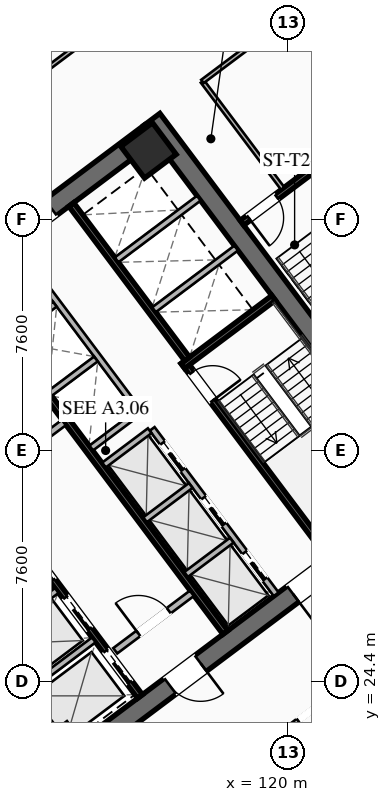
"""IFC4 building model, lengths in metres.
Left out: names, types, materials, properties, quantities, classifications, styles, units other than length and angle.
Written with IfcOpenShell. Run it as: python <this file> out.ifc"""

import sys

from ifc_helpers import new_model, si_unit, direction, frame, frame_2d, origin, origin_2d, place, context, subcontext, project, spatial, rectangle, hollow_rectangle, extrude, element, fill, save


model = new_model("IFC4")
c1 = context("Model", 3, precision=1e-05, world=origin(), true_north=direction((0.0, 1.0)))
c2 = subcontext(c1, "Body", "Model", "MODEL_VIEW")
j1 = project(units=[si_unit("LENGTHUNIT", "METRE"), si_unit("PLANEANGLEUNIT", "RADIAN")], contexts=[c1])
p1 = place(None, origin())
s1 = spatial("IfcSite", under=j1, at=p1, CompositionType="ELEMENT")
p2 = place(p1, origin())
s2 = spatial("IfcBuilding", under=s1, at=p2, CompositionType="ELEMENT")
p3 = place(p2, frame((0.0, 0.0, 84.95)))
s3 = spatial("IfcBuildingStorey", under=s2, at=p3, CompositionType="ELEMENT", Elevation=84.95)
for number, where, z_axis, x_axis in (
    (1, (112.476, 21.107, 0.0), (0.0, 0.0, 1.0), (-0.6, 0.8, 0.0)),
    (2, (115.524, 42.893, 0.0), (0.0, 0.0, 1.0), (0.6, -0.8, 0.0)),
):
    element("IfcWall", number, at=place(p3, frame(where, z_axis=z_axis, x_axis=x_axis)), inside=s3, PredefinedType="SHEAR", context=c2, shape_type="SweptSolid", body=[
        extrude(rectangle(XDim=15.6, YDim=0.65, at=frame_2d((7.8, 0.0))), origin(), (0.0, 0.0, 1.0), 3.55),
    ])
p4 = place(p3, frame((124.429, 30.478, 0.0), z_axis=(0.0, 0.0, 1.0), x_axis=(-0.799998028465, -0.600002628705, 0.0)))
e3 = element("IfcWall", 3, at=p4, inside=s3, PredefinedType="SHEAR", context=c2, shape_type="SweptSolid", body=[
    extrude(rectangle(XDim=14.86, YDim=0.65, at=frame_2d((7.43, 0.0))), origin(), (0.0, 0.0, 1.0), 3.55),
])
p5 = place(p4, frame((9.13, 0.0, 0.0)))
e4 = element("IfcOpeningElement", 4, at=p5, cuts=e3, PredefinedType="OPENING", context=c2, shape_type="SweptSolid", body=[
    extrude(rectangle(XDim=1.25, YDim=2.25, at=frame_2d((0.625, 1.125))), frame((0.0, 0.335, 0.0), z_axis=(0.0, -1.0, 0.0), x_axis=(1.0, 0.0, 0.0)), (0.0, 0.0, 1.0), 0.67),
])
p6 = place(p4, frame((4.08, 0.0, 0.0)))
e5 = element("IfcOpeningElement", 5, at=p6, cuts=e3, PredefinedType="OPENING", context=c2, shape_type="SweptSolid", body=[
    extrude(rectangle(XDim=1.25, YDim=2.25, at=frame_2d((0.625, 1.125))), frame((0.0, 0.335, 0.0), z_axis=(0.0, -1.0, 0.0), x_axis=(1.0, 0.0, 0.0)), (0.0, 0.0, 1.0), 0.67),
])
p7 = place(p3, frame((103.571, 33.522, 0.0), z_axis=(0.0, 0.0, 1.0), x_axis=(0.799998028465, 0.600002628705, 0.0)))
e6 = element("IfcWall", 6, at=p7, inside=s3, PredefinedType="SHEAR", context=c2, shape_type="SweptSolid", body=[
    extrude(rectangle(XDim=14.86, YDim=0.65, at=frame_2d((7.43, 0.0))), origin(), (0.0, 0.0, 1.0), 3.55),
])
p8 = place(p7, frame((4.48, 0.0, 0.0)))
e7 = element("IfcOpeningElement", 7, at=p8, cuts=e6, PredefinedType="OPENING", context=c2, shape_type="SweptSolid", body=[
    extrude(rectangle(XDim=1.25, YDim=2.25, at=frame_2d((0.625, 1.125))), frame((0.0, 0.335, 0.0), z_axis=(0.0, -1.0, 0.0), x_axis=(1.0, 0.0, 0.0)), (0.0, 0.0, 1.0), 0.67),
])
p9 = place(p7, frame((9.53, 0.0, 0.0)))
e8 = element("IfcOpeningElement", 8, at=p9, cuts=e6, PredefinedType="OPENING", context=c2, shape_type="SweptSolid", body=[
    extrude(rectangle(XDim=1.25, YDim=2.25, at=frame_2d((0.625, 1.125))), frame((0.0, 0.335, 0.0), z_axis=(0.0, -1.0, 0.0), x_axis=(1.0, 0.0, 0.0)), (0.0, 0.0, 1.0), 0.67),
])
p10 = place(p3, frame((115.41, 41.87, 0.0), z_axis=(0.0, 0.0, 1.0), x_axis=(0.799999996291, 0.600000004945, 0.0)))
e9 = element("IfcColumn", 9, at=p10, inside=s3, PredefinedType="COLUMN", context=c2, shape_type="SweptSolid", body=[
    extrude(hollow_rectangle(XDim=1.3, YDim=1.3, WallThickness=0.05, at=origin_2d()), origin(), (0.0, 0.0, 1.0), 3.35),
])
p11 = place(p3, frame((116.56, 34.92, 0.0), z_axis=(0.0, 0.0, 1.0), x_axis=(0.600009827119, -0.799992629566, 0.0)))
e10 = element("IfcWall", 10, at=p11, inside=s3, PredefinedType="SHEAR", context=c2, shape_type="SweptSolid", body=[
    extrude(rectangle(XDim=7.95, YDim=0.2, at=frame_2d((3.975, 0.0))), origin(), (0.0, 0.0, 1.0), 3.35),
])
p12 = place(p11, frame((0.45, 0.0, 0.0)))
e11 = element("IfcOpeningElement", 11, at=p12, cuts=e10, PredefinedType="OPENING", context=c2, shape_type="SweptSolid", body=[
    extrude(rectangle(XDim=1.15, YDim=2.2, at=frame_2d((0.575, 1.1))), frame((0.0, 0.11, 0.0), z_axis=(0.0, -1.0, 0.0), x_axis=(1.0, 0.0, 0.0)), (0.0, 0.0, 1.0), 0.22),
])
p13 = place(p3, frame((116.54, 34.78, 0.0), z_axis=(0.0, 0.0, 1.0), x_axis=(0.799984290658, 0.600020945218, 0.0)))
e12 = element("IfcWall", 12, at=p13, inside=s3, PredefinedType="SHEAR", context=c2, shape_type="SweptSolid", body=[
    extrude(rectangle(XDim=3.73, YDim=0.2, at=frame_2d((1.865, 0.0))), origin(), (0.0, 0.0, 1.0), 3.35),
])
p14 = place(p3, frame((117.938, 26.016, 0.0), z_axis=(0.0, 0.0, 1.0), x_axis=(-0.600005463273, 0.799995902516, 0.0)))
e13 = element("IfcWall", 13, at=p14, inside=s3, PredefinedType="SHEAR", context=c2, shape_type="SweptSolid", body=[
    extrude(rectangle(XDim=14.3, YDim=0.2, at=frame_2d((7.15, 0.0))), origin(), (0.0, 0.0, 1.0), 3.35),
])
p15 = place(p3, frame((110.104, 31.028, 0.0), z_axis=(0.0, 0.0, 1.0), x_axis=(0.800018601094, 0.59997519774, 0.0)))
e14 = element("IfcWall", 14, at=p15, inside=s3, PredefinedType="SOLIDWALL", context=c2, shape_type="SweptSolid", body=[
    extrude(rectangle(XDim=3.15, YDim=0.22, at=frame_2d((1.575, 0.0))), origin(), (0.0, 0.0, 1.0), 2.703),
])
p16 = place(p15, frame((1.1, 0.0, 0.0)))
e15 = element("IfcOpeningElement", 15, at=p16, cuts=e14, PredefinedType="OPENING", context=c2, shape_type="SweptSolid", body=[
    extrude(rectangle(XDim=0.95, YDim=2.05, at=frame_2d((0.475, 1.025))), frame((0.0, 0.12, 0.0), z_axis=(0.0, -1.0, 0.0), x_axis=(1.0, 0.0, 0.0)), (0.0, 0.0, 1.0), 0.24),
])
p17 = place(p3, frame((114.316, 25.412, 0.0), z_axis=(0.0, 0.0, 1.0), x_axis=(0.800018601094, 0.59997519774, 0.0)))
e16 = element("IfcWall", 16, at=p17, inside=s3, PredefinedType="SOLIDWALL", context=c2, shape_type="SweptSolid", body=[
    extrude(rectangle(XDim=3.15, YDim=0.22, at=frame_2d((1.575, 0.0))), origin(), (0.0, 0.0, 1.0), 2.703),
])
p18 = place(p17, frame((0.95, 0.0, 0.0)))
e17 = element("IfcOpeningElement", 17, at=p18, cuts=e16, PredefinedType="OPENING", context=c2, shape_type="SweptSolid", body=[
    extrude(rectangle(XDim=1.25, YDim=2.25, at=frame_2d((0.625, 1.125))), frame((0.0, 0.12, 0.0), z_axis=(0.0, -1.0, 0.0), x_axis=(1.0, 0.0, 0.0)), (0.0, 0.0, 1.0), 0.24),
])
p19 = place(p3, frame((115.13, 23.91, 0.0), z_axis=(0.0, 0.0, 1.0), x_axis=(-0.599975393228, 0.800018454488, 0.0)))
e18 = element("IfcWall", 18, at=p19, inside=s3, PredefinedType="SHEAR", context=c2, shape_type="SweptSolid", body=[
    extrude(rectangle(XDim=6.35, YDim=0.2, at=frame_2d((3.175, 0.0))), origin(), (0.0, 0.0, 1.0), 3.35),
])
p20 = place(p19, frame((4.775, 0.0, 0.0)))
e19 = element("IfcOpeningElement", 19, at=p20, cuts=e18, PredefinedType="OPENING", context=c2, shape_type="SweptSolid", body=[
    extrude(rectangle(XDim=1.3, YDim=2.25, at=frame_2d((0.65, 1.125))), frame((0.0, 0.11, 0.0), z_axis=(0.0, -1.0, 0.0), x_axis=(1.0, 0.0, 0.0)), (0.0, 0.0, 1.0), 0.22),
])
p21 = place(p19, frame((2.775, 0.0, 0.0)))
e20 = element("IfcOpeningElement", 20, at=p21, cuts=e18, PredefinedType="OPENING", context=c2, shape_type="SweptSolid", body=[
    extrude(rectangle(XDim=1.3, YDim=2.25, at=frame_2d((0.65, 1.125))), frame((0.0, 0.11, 0.0), z_axis=(0.0, -1.0, 0.0), x_axis=(1.0, 0.0, 0.0)), (0.0, 0.0, 1.0), 0.22),
])
p22 = place(p19, frame((0.575, 0.0, 0.0)))
e21 = element("IfcOpeningElement", 21, at=p22, cuts=e18, PredefinedType="OPENING", context=c2, shape_type="SweptSolid", body=[
    extrude(rectangle(XDim=1.3, YDim=2.25, at=frame_2d((0.65, 1.125))), frame((0.0, 0.11, 0.0), z_axis=(0.0, -1.0, 0.0), x_axis=(1.0, 0.0, 0.0)), (0.0, 0.0, 1.0), 0.22),
])
for number, where, z_axis, x_axis in (
    (22, (110.906, 23.742, 0.0), (0.0, 0.0, 1.0), (0.8, 0.6, 0.0)),
    (23, (109.688, 25.366, 0.0), (0.0, 0.0, 1.0), (0.8, 0.6, 0.0)),
):
    element("IfcWall", number, at=place(p3, frame(where, z_axis=z_axis, x_axis=x_axis)), inside=s3, PredefinedType="SOLIDWALL", context=c2, shape_type="SweptSolid", body=[
        extrude(rectangle(XDim=3.38, YDim=0.2, at=frame_2d((1.69, 0.0))), origin(), (0.0, 0.0, 1.0), 3.35),
    ])
p23 = place(p3, frame((112.87, 40.09, 0.0), z_axis=(0.0, 0.0, 1.0), x_axis=(0.599975393228, -0.800018454488, 0.0)))
e24 = element("IfcWall", 24, at=p23, inside=s3, PredefinedType="SHEAR", context=c2, shape_type="SweptSolid", body=[
    extrude(rectangle(XDim=6.35, YDim=0.2, at=frame_2d((3.175, 0.0))), origin(), (0.0, 0.0, 1.0), 3.35),
])
for number, where, z_axis, x_axis in (
    (25, (115.59, 36.63, 0.0), (0.0, 0.0, 1.0), (0.8, 0.6, 0.0)),
    (26, (114.36, 38.27, 0.0), (0.0, 0.0, 1.0), (0.8, 0.6, 0.0)),
):
    element("IfcWall", number, at=place(p3, frame(where, z_axis=z_axis, x_axis=x_axis)), inside=s3, PredefinedType="SOLIDWALL", context=c2, shape_type="SweptSolid", body=[
        extrude(rectangle(XDim=3.38, YDim=0.2, at=frame_2d((1.69, 0.0))), origin(), (0.0, 0.0, 1.0), 3.35),
    ])
p24 = place(p3, frame((119.61, 27.27, 0.0), z_axis=(0.0, 0.0, 1.0), x_axis=(-0.600011488909, 0.79999138319, 0.0)))
e27 = element("IfcWall", 27, at=p24, inside=s3, PredefinedType="SOLIDWALL", context=c2, shape_type="SweptSolid", body=[
    extrude(rectangle(XDim=6.8, YDim=0.2, at=frame_2d((3.4, 0.0))), origin(), (0.0, 0.0, 1.0), 3.35),
])
p25 = place(p24, frame((0.625, 0.0, 0.0)))
e28 = element("IfcOpeningElement", 28, at=p25, cuts=e27, PredefinedType="OPENING", context=c2, shape_type="SweptSolid", body=[
    extrude(rectangle(XDim=1.1, YDim=2.2, at=frame_2d((0.55, 1.1))), frame((0.0, 0.11, 0.0), z_axis=(0.0, -1.0, 0.0), x_axis=(1.0, 0.0, 0.0)), (0.0, 0.0, 1.0), 0.22),
])
p26 = place(p24, frame((2.875, 0.0, 0.0)))
e29 = element("IfcOpeningElement", 29, at=p26, cuts=e27, PredefinedType="OPENING", context=c2, shape_type="SweptSolid", body=[
    extrude(rectangle(XDim=1.1, YDim=2.2, at=frame_2d((0.55, 1.1))), frame((0.0, 0.11, 0.0), z_axis=(0.0, -1.0, 0.0), x_axis=(1.0, 0.0, 0.0)), (0.0, 0.0, 1.0), 0.22),
])
p27 = place(p24, frame((5.125, 0.0, 0.0)))
e30 = element("IfcOpeningElement", 30, at=p27, cuts=e27, PredefinedType="OPENING", context=c2, shape_type="SweptSolid", body=[
    extrude(rectangle(XDim=1.1, YDim=2.2, at=frame_2d((0.55, 1.1))), frame((0.0, 0.11, 0.0), z_axis=(0.0, -1.0, 0.0), x_axis=(1.0, 0.0, 0.0)), (0.0, 0.0, 1.0), 0.22),
])
p28 = place(p3, frame((116.646, 27.922, 0.0), z_axis=(0.0, 0.0, 1.0), x_axis=(0.8, 0.6, 0.0)))
e31 = element("IfcWall", 31, at=p28, inside=s3, PredefinedType="SOLIDWALL", context=c2, shape_type="SweptSolid", body=[
    extrude(rectangle(XDim=1.88, YDim=0.2, at=frame_2d((0.94, 0.0))), origin(), (0.0, 0.0, 1.0), 3.35),
])
p29 = place(p3, frame((115.296, 29.722, 0.0), z_axis=(0.0, 0.0, 1.0), x_axis=(0.799984418148, 0.600020775241, 0.0)))
e32 = element("IfcWall", 32, at=p29, inside=s3, PredefinedType="SOLIDWALL", context=c2, shape_type="SweptSolid", body=[
    extrude(rectangle(XDim=1.88, YDim=0.2, at=frame_2d((0.94, 0.0))), origin(), (0.0, 0.0, 1.0), 3.35),
])
p30 = place(p3, frame((113.946, 31.522, 0.0), z_axis=(0.0, 0.0, 1.0), x_axis=(0.8, 0.6, 0.0)))
e33 = element("IfcWall", 33, at=p30, inside=s3, PredefinedType="SOLIDWALL", context=c2, shape_type="SweptSolid", body=[
    extrude(rectangle(XDim=1.88, YDim=0.2, at=frame_2d((0.94, 0.0))), origin(), (0.0, 0.0, 1.0), 3.35),
])
p31 = place(p3, frame((115.11, 33.27, 0.0), z_axis=(0.0, 0.0, 1.0), x_axis=(-0.600011488909, 0.79999138319, 0.0)))
e34 = element("IfcWall", 34, at=p31, inside=s3, PredefinedType="SOLIDWALL", context=c2, shape_type="SweptSolid", body=[
    extrude(rectangle(XDim=6.8, YDim=0.2, at=frame_2d((3.4, 0.0))), origin(), (0.0, 0.0, 1.0), 3.35),
])
p32 = place(p3, frame((113.526, 32.082, 0.0), z_axis=(0.0, 0.0, 1.0), x_axis=(0.800046745961, 0.599937666993, 0.0)))
e35 = element("IfcWall", 35, at=p32, inside=s3, PredefinedType="SOLIDWALL", context=c2, shape_type="SweptSolid", body=[
    extrude(rectangle(XDim=1.88, YDim=0.2, at=frame_2d((0.94, 0.0))), origin(), (0.0, 0.0, 1.0), 3.35),
])
p33 = place(p3, frame((112.176, 33.882, 0.0), z_axis=(0.0, 0.0, 1.0), x_axis=(0.8, 0.6, 0.0)))
e36 = element("IfcWall", 36, at=p33, inside=s3, PredefinedType="SOLIDWALL", context=c2, shape_type="SweptSolid", body=[
    extrude(rectangle(XDim=1.88, YDim=0.2, at=frame_2d((0.94, 0.0))), origin(), (0.0, 0.0, 1.0), 3.35),
])
p34 = place(p3, frame((110.826, 35.682, 0.0), z_axis=(0.0, 0.0, 1.0), x_axis=(0.799984418148, 0.600020775241, 0.0)))
e37 = element("IfcWall", 37, at=p34, inside=s3, PredefinedType="SOLIDWALL", context=c2, shape_type="SweptSolid", body=[
    extrude(rectangle(XDim=1.88, YDim=0.2, at=frame_2d((0.94, 0.0))), origin(), (0.0, 0.0, 1.0), 3.35),
])
p35 = place(p3, frame((121.204, 41.528, 0.0), z_axis=(0.0, 0.0, 1.0), x_axis=(-0.800017232136, -0.599977023131, 0.0)))
e38 = element("IfcWall", 38, at=p35, inside=s3, PredefinedType="SHEAR", context=c2, shape_type="SweptSolid", body=[
    extrude(rectangle(XDim=3.4, YDim=0.2, at=frame_2d((1.7, 0.0))), origin(), (0.0, 0.0, 1.0), 3.35),
])
p36 = place(p35, frame((1.975, 0.0, 0.0)))
e39 = element("IfcOpeningElement", 39, at=p36, cuts=e38, PredefinedType="OPENING", context=c2, shape_type="SweptSolid", body=[
    extrude(rectangle(XDim=1.15, YDim=2.2, at=frame_2d((0.575, 1.1))), frame((0.0, 0.11, 0.0), z_axis=(0.0, -1.0, 0.0), x_axis=(1.0, 0.0, 0.0)), (0.0, 0.0, 1.0), 0.22),
])
p37 = place(p3, frame((119.824, 40.618, 0.0), z_axis=(0.0, 0.0, 1.0), x_axis=(-0.599982243973, 0.800013316712, 0.0)))
e40 = element("IfcWall", 40, at=p37, inside=s3, PredefinedType="PARTITIONING", context=c2, shape_type="SweptSolid", body=[
    extrude(rectangle(XDim=4.4, YDim=0.135, at=frame_2d((2.2, 0.0))), origin(), (0.0, 0.0, 1.0), 2.703),
])
p38 = place(p3, frame((98.336, 34.252, 0.0), z_axis=(0.0, 0.0, 1.0), x_axis=(0.8, 0.6, 0.0)))
e41 = element("IfcWall", 41, at=p38, inside=s3, PredefinedType="PARTITIONING", context=c2, shape_type="SweptSolid", body=[
    extrude(rectangle(XDim=28.23, YDim=0.135, at=frame_2d((14.115, 0.0))), origin(), (0.0, 0.0, 1.0), 2.703),
])
p39 = place(p38, frame((0.3, 0.0, 0.0)))
e42 = element("IfcOpeningElement", 42, at=p39, cuts=e41, PredefinedType="OPENING", context=c2, shape_type="SweptSolid", body=[
    extrude(rectangle(XDim=0.95, YDim=2.05, at=frame_2d((0.475, 1.025))), frame((0.0, 0.077, 0.0), z_axis=(0.0, -1.0, 0.0), x_axis=(1.0, 0.0, 0.0)), (0.0, 0.0, 1.0), 0.155),
])
p40 = place(p38, frame((10.953, 0.0, 0.0)))
e43 = element("IfcOpeningElement", 43, at=p40, cuts=e41, PredefinedType="OPENING", context=c2, shape_type="SweptSolid", body=[
    extrude(rectangle(XDim=0.95, YDim=2.05, at=frame_2d((0.475, 1.025))), frame((0.0, 0.077, 0.0), z_axis=(0.0, -1.0, 0.0), x_axis=(1.0, 0.0, 0.0)), (0.0, 0.0, 1.0), 0.155),
])
p41 = place(p38, frame((14.758, 0.0, 0.0)))
e44 = element("IfcOpeningElement", 44, at=p41, cuts=e41, PredefinedType="OPENING", context=c2, shape_type="SweptSolid", body=[
    extrude(rectangle(XDim=0.95, YDim=2.05, at=frame_2d((0.475, 1.025))), frame((0.0, 0.077, 0.0), z_axis=(0.0, -1.0, 0.0), x_axis=(1.0, 0.0, 0.0)), (0.0, 0.0, 1.0), 0.155),
])
p42 = place(p38, frame((26.98, 0.0, 0.0)))
e45 = element("IfcOpeningElement", 45, at=p42, cuts=e41, PredefinedType="OPENING", context=c2, shape_type="SweptSolid", body=[
    extrude(rectangle(XDim=0.95, YDim=2.05, at=frame_2d((0.475, 1.025))), frame((0.0, 0.077, 0.0), z_axis=(0.0, -1.0, 0.0), x_axis=(1.0, 0.0, 0.0)), (0.0, 0.0, 1.0), 0.155),
])
p43 = place(p3, frame((134.18, 33.51, 0.0), z_axis=(0.0, 0.0, 1.0), x_axis=(-0.8, -0.6, 0.0)))
e46 = element("IfcWall", 46, at=p43, inside=s3, PredefinedType="PARTITIONING", context=c2, shape_type="SweptSolid", body=[
    extrude(rectangle(XDim=28.23, YDim=0.135, at=frame_2d((14.115, 0.0))), origin(), (0.0, 0.0, 1.0), 2.703),
])
p44 = place(p43, frame((26.9, 0.0, 0.0)))
e47 = element("IfcOpeningElement", 47, at=p44, cuts=e46, PredefinedType="OPENING", context=c2, shape_type="SweptSolid", body=[
    extrude(rectangle(XDim=0.95, YDim=2.05, at=frame_2d((0.475, 1.025))), frame((0.0, 0.077, 0.0), z_axis=(0.0, -1.0, 0.0), x_axis=(1.0, 0.0, 0.0)), (0.0, 0.0, 1.0), 0.155),
])
p45 = place(p43, frame((16.368, 0.0, 0.0)))
e48 = element("IfcOpeningElement", 48, at=p45, cuts=e46, PredefinedType="OPENING", context=c2, shape_type="SweptSolid", body=[
    extrude(rectangle(XDim=0.95, YDim=2.05, at=frame_2d((0.475, 1.025))), frame((0.0, 0.077, 0.0), z_axis=(0.0, -1.0, 0.0), x_axis=(1.0, 0.0, 0.0)), (0.0, 0.0, 1.0), 0.155),
])
p46 = place(p43, frame((0.38, 0.0, 0.0)))
e49 = element("IfcOpeningElement", 49, at=p46, cuts=e46, PredefinedType="OPENING", context=c2, shape_type="SweptSolid", body=[
    extrude(rectangle(XDim=0.95, YDim=2.05, at=frame_2d((0.475, 1.025))), frame((0.0, 0.077, 0.0), z_axis=(0.0, -1.0, 0.0), x_axis=(1.0, 0.0, 0.0)), (0.0, 0.0, 1.0), 0.155),
])
p47 = place(p3, frame((125.224, 50.168, 0.0), z_axis=(0.0, 0.0, 1.0), x_axis=(-0.8, -0.6, 0.0)))
e50 = element("IfcWall", 50, at=p47, inside=s3, PredefinedType="PARTITIONING", context=c2, shape_type="SweptSolid", body=[
    extrude(rectangle(XDim=10.05, YDim=0.135, at=frame_2d((5.025, 0.0))), origin(), (0.0, 0.0, 1.0), 2.703),
])
p48 = place(p47, frame((4.9, 0.0, 0.0)))
e51 = element("IfcOpeningElement", 51, at=p48, cuts=e50, PredefinedType="OPENING", context=c2, shape_type="SweptSolid", body=[
    extrude(rectangle(XDim=0.95, YDim=2.05, at=frame_2d((0.475, 1.025))), frame((0.0, 0.077, 0.0), z_axis=(0.0, -1.0, 0.0), x_axis=(1.0, 0.0, 0.0)), (0.0, 0.0, 1.0), 0.155),
])
p49 = place(p5, origin())
e52 = element("IfcDoor", 52, at=p49, inside=s3, OperationType="SINGLE_SWING_LEFT", PredefinedType="DOOR", context=c2, shape_type="SweptSolid", body=[
    extrude(rectangle(XDim=1.25, YDim=2.25, at=frame_2d((0.625, 1.125))), frame((0.0, 0.025, 0.0), z_axis=(0.0, -1.0, 0.0), x_axis=(1.0, 0.0, 0.0)), (0.0, 0.0, 1.0), 0.05),
])
fill(e4, e52)
p50 = place(p6, origin())
e53 = element("IfcDoor", 53, at=p50, inside=s3, OperationType="SINGLE_SWING_RIGHT", PredefinedType="DOOR", context=c2, shape_type="SweptSolid", body=[
    extrude(rectangle(XDim=1.25, YDim=2.25, at=frame_2d((0.625, 1.125))), frame((0.0, 0.025, 0.0), z_axis=(0.0, -1.0, 0.0), x_axis=(1.0, 0.0, 0.0)), (0.0, 0.0, 1.0), 0.05),
])
fill(e5, e53)
p51 = place(p12, origin())
e54 = element("IfcDoor", 54, at=p51, inside=s3, OperationType="SINGLE_SWING_RIGHT", PredefinedType="DOOR", context=c2, shape_type="SweptSolid", body=[
    extrude(rectangle(XDim=1.15, YDim=2.2, at=frame_2d((0.575, 1.1))), frame((0.0, 0.025, 0.0), z_axis=(0.0, -1.0, 0.0), x_axis=(1.0, 0.0, 0.0)), (0.0, 0.0, 1.0), 0.05),
])
fill(e11, e54)
p52 = place(p18, origin())
e55 = element("IfcDoor", 55, at=p52, inside=s3, OperationType="SINGLE_SWING_LEFT", PredefinedType="DOOR", context=c2, shape_type="SweptSolid", body=[
    extrude(rectangle(XDim=1.25, YDim=2.25, at=frame_2d((0.625, 1.125))), frame((0.0, 0.025, 0.0), z_axis=(0.0, -1.0, 0.0), x_axis=(1.0, 0.0, 0.0)), (0.0, 0.0, 1.0), 0.05),
])
fill(e17, e55)
p53 = place(p36, origin())
e56 = element("IfcDoor", 56, at=p53, inside=s3, OperationType="SINGLE_SWING_RIGHT", PredefinedType="DOOR", context=c2, shape_type="SweptSolid", body=[
    extrude(rectangle(XDim=1.15, YDim=2.2, at=frame_2d((0.575, 1.1))), frame((0.0, 0.025, 0.0), z_axis=(0.0, -1.0, 0.0), x_axis=(1.0, 0.0, 0.0)), (0.0, 0.0, 1.0), 0.05),
])
fill(e39, e56)
p54 = place(p45, origin())
e57 = element("IfcDoor", 57, at=p54, inside=s3, OperationType="SINGLE_SWING_LEFT", PredefinedType="DOOR", context=c2, shape_type="SweptSolid", body=[
    extrude(rectangle(XDim=0.95, YDim=2.05, at=frame_2d((0.475, 1.025))), frame((0.0, 0.025, 0.0), z_axis=(0.0, -1.0, 0.0), x_axis=(1.0, 0.0, 0.0)), (0.0, 0.0, 1.0), 0.05),
])
fill(e48, e57)
p55 = place(p20, origin())
e58 = element("IfcDoor", 58, at=p55, inside=s3, OperationType="SLIDING_TO_LEFT", PredefinedType="DOOR", context=c2, shape_type="SweptSolid", body=[
    extrude(rectangle(XDim=1.3, YDim=2.25, at=frame_2d((0.65, 1.125))), frame((0.0, 0.025, 0.0), z_axis=(0.0, -1.0, 0.0), x_axis=(1.0, 0.0, 0.0)), (0.0, 0.0, 1.0), 0.05),
])
fill(e19, e58)
p56 = place(p21, origin())
e59 = element("IfcDoor", 59, at=p56, inside=s3, OperationType="SLIDING_TO_LEFT", PredefinedType="DOOR", context=c2, shape_type="SweptSolid", body=[
    extrude(rectangle(XDim=1.3, YDim=2.25, at=frame_2d((0.65, 1.125))), frame((0.0, 0.025, 0.0), z_axis=(0.0, -1.0, 0.0), x_axis=(1.0, 0.0, 0.0)), (0.0, 0.0, 1.0), 0.05),
])
fill(e20, e59)
p57 = place(p22, origin())
e60 = element("IfcDoor", 60, at=p57, inside=s3, OperationType="SLIDING_TO_LEFT", PredefinedType="DOOR", context=c2, shape_type="SweptSolid", body=[
    extrude(rectangle(XDim=1.3, YDim=2.25, at=frame_2d((0.65, 1.125))), frame((0.0, 0.025, 0.0), z_axis=(0.0, -1.0, 0.0), x_axis=(1.0, 0.0, 0.0)), (0.0, 0.0, 1.0), 0.05),
])
fill(e21, e60)
p58 = place(p25, origin())
e61 = element("IfcDoor", 61, at=p58, inside=s3, OperationType="SLIDING_TO_LEFT", PredefinedType="DOOR", context=c2, shape_type="SweptSolid", body=[
    extrude(rectangle(XDim=1.1, YDim=2.2, at=frame_2d((0.55, 1.1))), frame((0.0, 0.025, 0.0), z_axis=(0.0, -1.0, 0.0), x_axis=(1.0, 0.0, 0.0)), (0.0, 0.0, 1.0), 0.05),
])
fill(e28, e61)
p59 = place(p26, origin())
e62 = element("IfcDoor", 62, at=p59, inside=s3, OperationType="SLIDING_TO_LEFT", PredefinedType="DOOR", context=c2, shape_type="SweptSolid", body=[
    extrude(rectangle(XDim=1.1, YDim=2.2, at=frame_2d((0.55, 1.1))), frame((0.0, 0.025, 0.0), z_axis=(0.0, -1.0, 0.0), x_axis=(1.0, 0.0, 0.0)), (0.0, 0.0, 1.0), 0.05),
])
fill(e29, e62)
p60 = place(p27, origin())
e63 = element("IfcDoor", 63, at=p60, inside=s3, OperationType="SLIDING_TO_LEFT", PredefinedType="DOOR", context=c2, shape_type="SweptSolid", body=[
    extrude(rectangle(XDim=1.1, YDim=2.2, at=frame_2d((0.55, 1.1))), frame((0.0, 0.025, 0.0), z_axis=(0.0, -1.0, 0.0), x_axis=(1.0, 0.0, 0.0)), (0.0, 0.0, 1.0), 0.05),
])
fill(e30, e63)
save(model, sys.argv[1])
